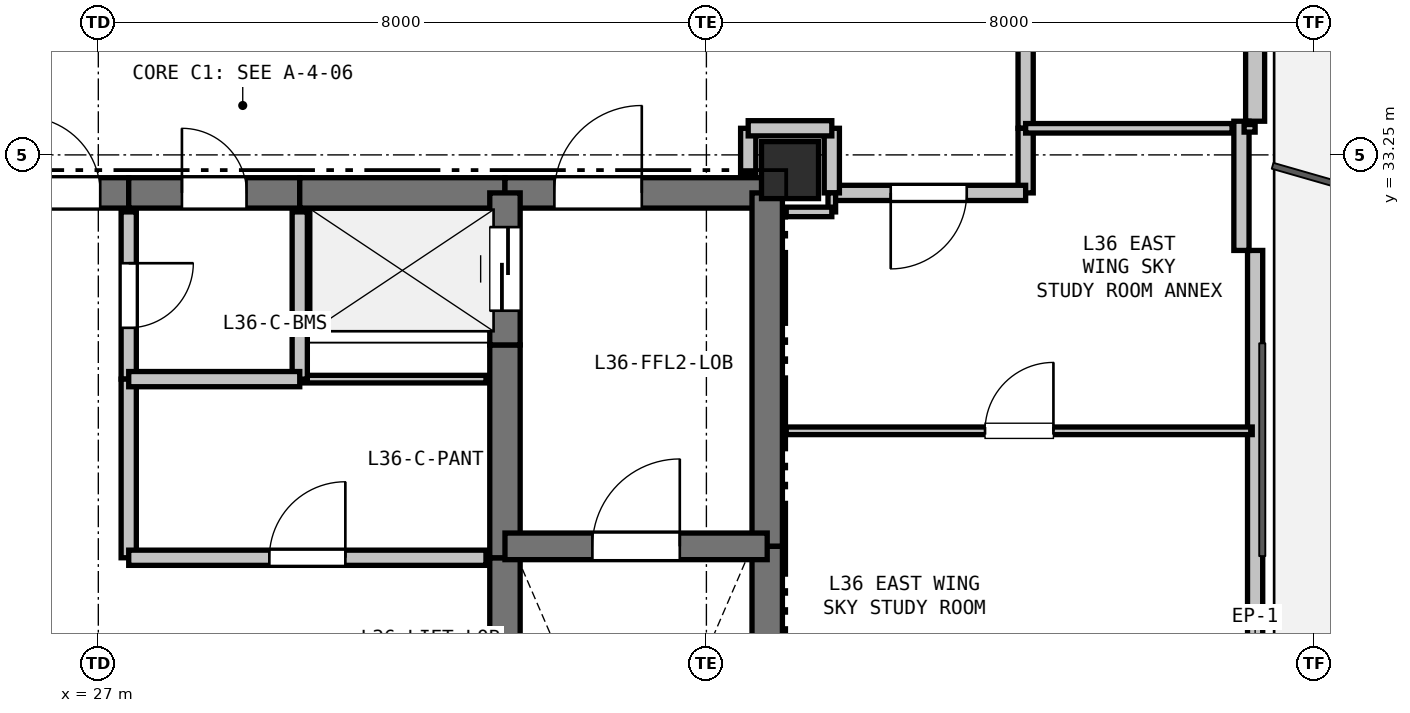
"""IFC4 building model, lengths in metres.
Left out: names, types, materials, properties, quantities, classifications, styles, units other than length and angle.
Written with IfcOpenShell. Run it as: python <this file> out.ifc"""

import sys

from ifc_helpers import new_model, si_unit, direction, frame, frame_2d, origin, origin_2d, place, context, subcontext, project, spatial, rectangle, extrude, element, fill, save


model = new_model("IFC4")
c1 = context("Model", 3, precision=1e-05, world=origin(), true_north=direction((0.0, 1.0)))
c2 = subcontext(c1, "Body", "Model", "MODEL_VIEW")
j1 = project(units=[si_unit("LENGTHUNIT", "METRE"), si_unit("PLANEANGLEUNIT", "RADIAN")], contexts=[c1])
p1 = place(None, origin())
s1 = spatial("IfcSite", under=j1, at=p1, CompositionType="ELEMENT")
p2 = place(p1, origin())
s2 = spatial("IfcBuilding", under=s1, at=p2, CompositionType="ELEMENT")
p3 = place(p2, frame((0.0, 0.0, 131.1)))
s3 = spatial("IfcBuildingStorey", under=s2, at=p3, CompositionType="ELEMENT", Elevation=131.1)
p4 = place(p3, frame((36.1, 33.05, 0.0), z_axis=(0.0, 0.0, 1.0), x_axis=(1.0, 0.0, 0.0)))
e1 = element("IfcColumn", 1, at=p4, inside=s3, PredefinedType="COLUMN", context=c2, shape_type="SweptSolid", body=[
    extrude(rectangle(XDim=0.75, YDim=0.75, at=origin_2d()), origin(), (0.0, 0.0, 1.0), 3.3),
])
p5 = place(p3, frame((42.219, 44.879, 0.0), z_axis=(0.0, 0.0, 1.0), x_axis=(0.0, -1.0, 0.0)))
e2 = element("IfcWall", 2, at=p5, inside=s3, PredefinedType="SOLIDWALL", context=c2, shape_type="SweptSolid", body=[
    extrude(rectangle(XDim=11.186, YDim=0.25, at=frame_2d((5.593, 0.0))), origin(), (0.0, 0.0, 1.0), 2.68),
])
p6 = place(p5, frame((8.109, 0.0, 0.0)))
e3 = element("IfcOpeningElement", 3, at=p6, cuts=e2, PredefinedType="OPENING", context=c2, shape_type="SweptSolid", body=[
    extrude(rectangle(XDim=1.1, YDim=2.1, at=frame_2d((0.55, 1.05))), frame((0.0, 0.135, 0.0), z_axis=(0.0, -1.0, 0.0), x_axis=(1.0, 0.0, 0.0)), (0.0, 0.0, 1.0), 0.27),
])
p7 = place(p5, frame((3.886, 0.0, 0.9)))
e4 = element("IfcOpeningElement", 4, at=p7, cuts=e2, PredefinedType="OPENING", context=c2, shape_type="SweptSolid", body=[
    extrude(rectangle(XDim=1.2, YDim=1.4, at=frame_2d((0.6, 0.7))), frame((0.0, 0.135, 0.0), z_axis=(0.0, -1.0, 0.0), x_axis=(1.0, 0.0, 0.0)), (0.0, 0.0, 1.0), 0.27),
])
p8 = place(p3, frame((42.219, 31.993, 0.0), z_axis=(0.0, 0.0, 1.0), x_axis=(0.0, -1.0, 0.0)))
e5 = element("IfcWall", 5, at=p8, inside=s3, PredefinedType="PARAPET", context=c2, shape_type="SweptSolid", body=[
    extrude(rectangle(XDim=10.486, YDim=0.2, at=frame_2d((5.243, 0.0))), origin(), (0.0, 0.0, 1.0), 0.2),
])
p9 = place(p3, frame((42.039, 33.693, 0.0), z_axis=(0.0, 0.0, 1.0), x_axis=(0.0, -1.0, 0.0)))
e6 = element("IfcWall", 6, at=p9, inside=s3, PredefinedType="PARAPET", context=c2, shape_type="SweptSolid", body=[
    extrude(rectangle(XDim=1.7, YDim=0.2, at=frame_2d((0.85, 0.0))), origin(), (0.0, 0.0, 1.0), 2.68),
])
p10 = place(p3, frame((25.65, 32.75, 0.0), z_axis=(0.0, 0.0, 1.0), x_axis=(1.0, 0.0, 0.0)))
e7 = element("IfcWall", 7, at=p10, inside=s3, PredefinedType="SHEAR", context=c2, shape_type="SweptSolid", body=[
    extrude(rectangle(XDim=1.75, YDim=0.4, at=frame_2d((0.875, 0.0))), origin(), (0.0, 0.0, 1.0), 3.06),
])
p11 = place(p10, frame((0.375, 0.0, 0.0)))
e8 = element("IfcOpeningElement", 8, at=p11, cuts=e7, PredefinedType="OPENING", context=c2, shape_type="SweptSolid", body=[
    extrude(rectangle(XDim=1.0, YDim=2.15, at=frame_2d((0.5, 1.075))), frame((0.0, 0.21, 0.0), z_axis=(0.0, -1.0, 0.0), x_axis=(1.0, 0.0, 0.0)), (0.0, 0.0, 1.0), 0.42),
])
p12 = place(p3, frame((27.4, 32.75, 0.0), z_axis=(0.0, 0.0, 1.0), x_axis=(1.0, 0.0, 0.0)))
e9 = element("IfcWall", 9, at=p12, inside=s3, PredefinedType="SHEAR", context=c2, shape_type="SweptSolid", body=[
    extrude(rectangle(XDim=2.25, YDim=0.4, at=frame_2d((1.125, 0.0))), origin(), (0.0, 0.0, 1.0), 3.06),
])
p13 = place(p12, frame((0.7, 0.0, 0.0)))
e10 = element("IfcOpeningElement", 10, at=p13, cuts=e9, PredefinedType="OPENING", context=c2, shape_type="SweptSolid", body=[
    extrude(rectangle(XDim=0.85, YDim=2.1, at=frame_2d((0.425, 1.05))), frame((0.0, 0.21, 0.0), z_axis=(0.0, -1.0, 0.0), x_axis=(1.0, 0.0, 0.0)), (0.0, 0.0, 1.0), 0.42),
])
p14 = place(p3, frame((29.65, 32.75, 0.0), z_axis=(0.0, 0.0, 1.0), x_axis=(1.0, 0.0, 0.0)))
e11 = element("IfcWall", 11, at=p14, inside=s3, PredefinedType="SHEAR", context=c2, shape_type="SweptSolid", body=[
    extrude(rectangle(XDim=2.7, YDim=0.4, at=frame_2d((1.35, 0.0))), origin(), (0.0, 0.0, 1.0), 3.06),
])
p15 = place(p3, frame((32.35, 32.75, 0.0), z_axis=(0.0, 0.0, 1.0), x_axis=(1.0, 0.0, 0.0)))
e12 = element("IfcWall", 12, at=p15, inside=s3, PredefinedType="SHEAR", context=c2, shape_type="SweptSolid", body=[
    extrude(rectangle(XDim=3.45, YDim=0.4, at=frame_2d((1.725, 0.0))), origin(), (0.0, 0.0, 1.0), 3.06),
])
p16 = place(p15, frame((0.65, 0.0, 0.0)))
e13 = element("IfcOpeningElement", 13, at=p16, cuts=e12, PredefinedType="OPENING", context=c2, shape_type="SweptSolid", body=[
    extrude(rectangle(XDim=1.15, YDim=2.15, at=frame_2d((0.575, 1.075))), frame((0.0, 0.21, 0.0), z_axis=(0.0, -1.0, 0.0), x_axis=(1.0, 0.0, 0.0)), (0.0, 0.0, 1.0), 0.42),
])
p17 = place(p3, frame((35.8, 32.75, 0.0), z_axis=(0.0, 0.0, 1.0), x_axis=(0.0, -1.0, 0.0)))
e14 = element("IfcWall", 14, at=p17, inside=s3, PredefinedType="SHEAR", context=c2, shape_type="SweptSolid", body=[
    extrude(rectangle(XDim=4.65, YDim=0.4, at=frame_2d((2.325, 0.0))), origin(), (0.0, 0.0, 1.0), 3.06),
])
p18 = place(p3, frame((35.8, 28.1, 0.0), z_axis=(0.0, 0.0, 1.0), x_axis=(0.0, -1.0, 0.0)))
e15 = element("IfcWall", 15, at=p18, inside=s3, PredefinedType="SHEAR", context=c2, shape_type="SweptSolid", body=[
    extrude(rectangle(XDim=7.35, YDim=0.4, at=frame_2d((3.675, 0.0))), origin(), (0.0, 0.0, 1.0), 3.06),
])
p19 = place(p3, frame((32.35, 25.55, 0.0), z_axis=(0.0, 0.0, 1.0), x_axis=(0.0, 1.0, 0.0)))
e16 = element("IfcWall", 16, at=p19, inside=s3, PredefinedType="SHEAR", context=c2, shape_type="SweptSolid", body=[
    extrude(rectangle(XDim=2.4, YDim=0.4, at=frame_2d((1.2, 0.0))), origin(), (0.0, 0.0, 1.0), 3.06),
])
p20 = place(p3, frame((32.35, 27.95, 0.0), z_axis=(0.0, 0.0, 1.0), x_axis=(0.0, 1.0, 0.0)))
e17 = element("IfcWall", 17, at=p20, inside=s3, PredefinedType="SHEAR", context=c2, shape_type="SweptSolid", body=[
    extrude(rectangle(XDim=2.8, YDim=0.4, at=frame_2d((1.4, 0.0))), origin(), (0.0, 0.0, 1.0), 3.06),
])
p21 = place(p3, frame((32.35, 30.75, 0.0), z_axis=(0.0, 0.0, 1.0), x_axis=(0.0, 1.0, 0.0)))
e18 = element("IfcWall", 18, at=p21, inside=s3, PredefinedType="SHEAR", context=c2, shape_type="SweptSolid", body=[
    extrude(rectangle(XDim=2.0, YDim=0.4, at=frame_2d((1.0, 0.0))), origin(), (0.0, 0.0, 1.0), 3.06),
])
p22 = place(p21, frame((0.45, 0.0, 0.0)))
e19 = element("IfcOpeningElement", 19, at=p22, cuts=e18, PredefinedType="OPENING", context=c2, shape_type="SweptSolid", body=[
    extrude(rectangle(XDim=1.1, YDim=2.15, at=frame_2d((0.55, 1.075))), frame((0.0, 0.21, 0.0), z_axis=(0.0, -1.0, 0.0), x_axis=(1.0, 0.0, 0.0)), (0.0, 0.0, 1.0), 0.42),
])
p23 = place(p3, frame((32.35, 28.1, 0.0), z_axis=(0.0, 0.0, 1.0), x_axis=(1.0, 0.0, 0.0)))
e20 = element("IfcWall", 20, at=p23, inside=s3, PredefinedType="SHEAR", context=c2, shape_type="SweptSolid", body=[
    extrude(rectangle(XDim=3.45, YDim=0.35, at=frame_2d((1.725, 0.0))), origin(), (0.0, 0.0, 1.0), 3.06),
])
p24 = place(p23, frame((1.15, 0.0, 0.0)))
e21 = element("IfcOpeningElement", 21, at=p24, cuts=e20, PredefinedType="OPENING", context=c2, shape_type="SweptSolid", body=[
    extrude(rectangle(XDim=1.15, YDim=2.15, at=frame_2d((0.575, 1.075))), frame((0.0, 0.185, 0.0), z_axis=(0.0, -1.0, 0.0), x_axis=(1.0, 0.0, 0.0)), (0.0, 0.0, 1.0), 0.37),
])
p25 = place(p3, frame((32.1, 30.3, 0.0), z_axis=(0.0, 0.0, 1.0), x_axis=(-1.0, 0.0, 0.0)))
e22 = element("IfcWall", 22, at=p25, inside=s3, PredefinedType="PARTITIONING", context=c2, shape_type="SweptSolid", body=[
    extrude(rectangle(XDim=2.45, YDim=0.1, at=frame_2d((1.225, 0.0))), origin(), (0.0, 0.0, 1.0), 3.06),
])
p26 = place(p3, frame((29.65, 30.3, 0.0), z_axis=(0.0, 0.0, 1.0), x_axis=(0.0, 1.0, 0.0)))
e23 = element("IfcWall", 23, at=p26, inside=s3, PredefinedType="PARTITIONING", context=c2, shape_type="SweptSolid", body=[
    extrude(rectangle(XDim=2.2, YDim=0.2, at=frame_2d((1.1, 0.0))), origin(), (0.0, 0.0, 1.0), 3.06),
])
p27 = place(p3, frame((27.4, 32.5, 0.0), z_axis=(0.0, 0.0, 1.0), x_axis=(0.0, -1.0, 0.0)))
e24 = element("IfcWall", 24, at=p27, inside=s3, PredefinedType="PARTITIONING", context=c2, shape_type="SweptSolid", body=[
    extrude(rectangle(XDim=2.2, YDim=0.2, at=frame_2d((1.1, 0.0))), origin(), (0.0, 0.0, 1.0), 3.06),
])
p28 = place(p27, frame((0.675, 0.0, 0.0)))
e25 = element("IfcOpeningElement", 25, at=p28, cuts=e24, PredefinedType="OPENING", context=c2, shape_type="SweptSolid", body=[
    extrude(rectangle(XDim=0.85, YDim=2.1, at=frame_2d((0.425, 1.05))), frame((0.0, 0.11, 0.0), z_axis=(0.0, -1.0, 0.0), x_axis=(1.0, 0.0, 0.0)), (0.0, 0.0, 1.0), 0.22),
])
p29 = place(p3, frame((27.4, 30.3, 0.0), z_axis=(0.0, 0.0, 1.0), x_axis=(0.0, -1.0, 0.0)))
e26 = element("IfcWall", 26, at=p29, inside=s3, PredefinedType="PARTITIONING", context=c2, shape_type="SweptSolid", body=[
    extrude(rectangle(XDim=2.35, YDim=0.2, at=frame_2d((1.175, 0.0))), origin(), (0.0, 0.0, 1.0), 3.06),
])
p30 = place(p3, frame((27.4, 27.95, 0.0), z_axis=(0.0, 0.0, 1.0), x_axis=(1.0, 0.0, 0.0)))
e27 = element("IfcWall", 27, at=p30, inside=s3, PredefinedType="PARTITIONING", context=c2, shape_type="SweptSolid", body=[
    extrude(rectangle(XDim=4.7, YDim=0.2, at=frame_2d((2.35, 0.0))), origin(), (0.0, 0.0, 1.0), 3.06),
])
p31 = place(p30, frame((1.85, 0.0, 0.0)))
e28 = element("IfcOpeningElement", 28, at=p31, cuts=e27, PredefinedType="OPENING", context=c2, shape_type="SweptSolid", body=[
    extrude(rectangle(XDim=1.0, YDim=2.15, at=frame_2d((0.5, 1.075))), frame((0.0, 0.11, 0.0), z_axis=(0.0, -1.0, 0.0), x_axis=(1.0, 0.0, 0.0)), (0.0, 0.0, 1.0), 0.22),
])
p32 = place(p3, frame((35.55, 33.6, 0.0), z_axis=(0.0, 0.0, 1.0), x_axis=(0.0, -1.0, 0.0)))
e29 = element("IfcWall", 29, at=p32, inside=s3, PredefinedType="PARTITIONING", context=c2, shape_type="SweptSolid", body=[
    extrude(rectangle(XDim=0.6, YDim=0.2, at=frame_2d((0.3, 0.0))), origin(), (0.0, 0.0, 1.0), 2.508),
])
p33 = place(p3, frame((39.2, 35.35, 0.0), z_axis=(0.0, 0.0, 1.0), x_axis=(0.0, -1.0, 0.0)))
e30 = element("IfcWall", 30, at=p33, inside=s3, PredefinedType="PARTITIONING", context=c2, shape_type="SweptSolid", body=[
    extrude(rectangle(XDim=1.75, YDim=0.2, at=frame_2d((0.875, 0.0))), origin(), (0.0, 0.0, 1.0), 3.06),
])
p34 = place(p3, frame((39.2, 33.6, 0.0), z_axis=(0.0, 0.0, 1.0), x_axis=(0.0, -1.0, 0.0)))
e31 = element("IfcWall", 31, at=p34, inside=s3, PredefinedType="PARTITIONING", context=c2, shape_type="SweptSolid", body=[
    extrude(rectangle(XDim=0.85, YDim=0.2, at=frame_2d((0.425, 0.0))), origin(), (0.0, 0.0, 1.0), 3.06),
])
p35 = place(p3, frame((39.2, 32.75, 0.0), z_axis=(0.0, 0.0, 1.0), x_axis=(-1.0, 0.0, 0.0)))
e32 = element("IfcWall", 32, at=p35, inside=s3, PredefinedType="PARTITIONING", context=c2, shape_type="SweptSolid", body=[
    extrude(rectangle(XDim=2.55, YDim=0.2, at=frame_2d((1.275, 0.0))), origin(), (0.0, 0.0, 1.0), 3.06),
])
p36 = place(p35, frame((0.775, 0.0, 0.0)))
e33 = element("IfcOpeningElement", 33, at=p36, cuts=e32, PredefinedType="OPENING", context=c2, shape_type="SweptSolid", body=[
    extrude(rectangle(XDim=1.0, YDim=2.15, at=frame_2d((0.5, 1.075))), frame((0.0, 0.11, 0.0), z_axis=(0.0, -1.0, 0.0), x_axis=(1.0, 0.0, 0.0)), (0.0, 0.0, 1.0), 0.22),
])
p37 = place(p3, frame((36.65, 32.75, 0.0), z_axis=(0.0, 0.0, 1.0), x_axis=(0.0, 1.0, 0.0)))
e34 = element("IfcWall", 34, at=p37, inside=s3, PredefinedType="PARTITIONING", context=c2, shape_type="SweptSolid", body=[
    extrude(rectangle(XDim=0.85, YDim=0.2, at=frame_2d((0.425, 0.0))), origin(), (0.0, 0.0, 1.0), 2.433),
])
p38 = place(p3, frame((36.65, 33.6, 0.0), z_axis=(0.0, 0.0, 1.0), x_axis=(-1.0, 0.0, 0.0)))
e35 = element("IfcWall", 35, at=p38, inside=s3, PredefinedType="PARTITIONING", context=c2, shape_type="SweptSolid", body=[
    extrude(rectangle(XDim=1.1, YDim=0.2, at=frame_2d((0.55, 0.0))), origin(), (0.0, 0.0, 1.0), 2.433),
])
p39 = place(p3, frame((27.4, 30.3, 0.0), z_axis=(0.0, 0.0, 1.0), x_axis=(1.0, 0.0, 0.0)))
e36 = element("IfcWall", 36, at=p39, inside=s3, PredefinedType="PARTITIONING", context=c2, shape_type="SweptSolid", body=[
    extrude(rectangle(XDim=2.25, YDim=0.2, at=frame_2d((1.125, 0.0))), origin(), (0.0, 0.0, 1.0), 3.06),
])
p40 = place(p3, frame((36.05, 29.62, 0.0), z_axis=(0.0, 0.0, 1.0), x_axis=(1.0, 0.0, 0.0)))
e37 = element("IfcWall", 37, at=p40, inside=s3, PredefinedType="PARTITIONING", context=c2, shape_type="SweptSolid", body=[
    extrude(rectangle(XDim=6.131, YDim=0.1, at=frame_2d((3.065, 0.0))), origin(), (0.0, 0.0, 1.0), 2.365),
])
p41 = place(p40, frame((2.615, 0.0, 0.0)))
e38 = element("IfcOpeningElement", 38, at=p41, cuts=e37, PredefinedType="OPENING", context=c2, shape_type="SweptSolid", body=[
    extrude(rectangle(XDim=0.9, YDim=2.1, at=frame_2d((0.45, 1.05))), frame((0.0, 0.06, 0.0), z_axis=(0.0, -1.0, 0.0), x_axis=(1.0, 0.0, 0.0)), (0.0, 0.0, 1.0), 0.12),
])
p42 = place(p3, frame((36.65, 32.5, 0.0), z_axis=(0.0, 0.0, 1.0), x_axis=(0.0, 1.0, 0.0)))
e39 = element("IfcWall", 39, at=p42, inside=s3, PredefinedType="PARTITIONING", context=c2, shape_type="SweptSolid", body=[
    extrude(rectangle(XDim=0.25, YDim=0.1, at=frame_2d((0.125, 0.0))), origin(), (0.0, 0.0, 1.0), 3.06),
])
p43 = place(p3, frame((39.2, 33.6, 0.0), z_axis=(0.0, 0.0, 1.0), x_axis=(1.0, 0.0, 0.0)))
e40 = element("IfcWall", 40, at=p43, inside=s3, PredefinedType="PARTITIONING", context=c2, shape_type="SweptSolid", body=[
    extrude(rectangle(XDim=2.715, YDim=0.125, at=frame_2d((1.358, 0.0))), origin(), (0.0, 0.0, 1.0), 2.365),
])
p44 = place(p3, frame((42.074, 33.6, 0.0), z_axis=(0.0, 0.0, 1.0), x_axis=(1.0, 0.0, 0.0)))
e41 = element("IfcWall", 41, at=p44, inside=s3, PredefinedType="PARTITIONING", context=c2, shape_type="SweptSolid", body=[
    extrude(rectangle(XDim=0.145, YDim=0.1, at=frame_2d((0.072, 0.0))), origin(), (0.0, 0.0, 1.0), 3.06),
])
p45 = place(p3, frame((36.05, 32.5, 0.0), z_axis=(0.0, 0.0, 1.0), x_axis=(1.0, 0.0, 0.0)))
e42 = element("IfcWall", 42, at=p45, inside=s3, PredefinedType="PARTITIONING", context=c2, shape_type="SweptSolid", body=[
    extrude(rectangle(XDim=0.6, YDim=0.125, at=frame_2d((0.3, 0.0))), origin(), (0.0, 0.0, 1.0), 2.508),
])
p46 = place(p11, origin())
e43 = element("IfcDoor", 43, at=p46, inside=s3, OperationType="SINGLE_SWING_LEFT", PredefinedType="DOOR", context=c2, shape_type="SweptSolid", body=[
    extrude(rectangle(XDim=1.0, YDim=2.15, at=frame_2d((0.5, 1.075))), frame((0.0, 0.025, 0.0), z_axis=(0.0, -1.0, 0.0), x_axis=(1.0, 0.0, 0.0)), (0.0, 0.0, 1.0), 0.05),
])
fill(e8, e43)
p47 = place(p22, origin())
e44 = element("IfcDoor", 44, at=p47, inside=s3, OperationType="SLIDING_TO_LEFT", PredefinedType="DOOR", context=c2, shape_type="SweptSolid", body=[
    extrude(rectangle(XDim=1.1, YDim=2.15, at=frame_2d((0.55, 1.075))), frame((0.0, 0.025, 0.0), z_axis=(0.0, -1.0, 0.0), x_axis=(1.0, 0.0, 0.0)), (0.0, 0.0, 1.0), 0.05),
])
fill(e19, e44)
p48 = place(p24, origin())
e45 = element("IfcDoor", 45, at=p48, inside=s3, OperationType="SINGLE_SWING_RIGHT", PredefinedType="DOOR", context=c2, shape_type="SweptSolid", body=[
    extrude(rectangle(XDim=1.15, YDim=2.15, at=frame_2d((0.575, 1.075))), frame((0.0, 0.025, 0.0), z_axis=(0.0, -1.0, 0.0), x_axis=(1.0, 0.0, 0.0)), (0.0, 0.0, 1.0), 0.05),
])
fill(e21, e45)
p49 = place(p16, origin())
e46 = element("IfcDoor", 46, at=p49, inside=s3, OperationType="SINGLE_SWING_RIGHT", PredefinedType="DOOR", context=c2, shape_type="SweptSolid", body=[
    extrude(rectangle(XDim=1.15, YDim=2.15, at=frame_2d((0.575, 1.075))), frame((0.0, 0.025, 0.0), z_axis=(0.0, -1.0, 0.0), x_axis=(1.0, 0.0, 0.0)), (0.0, 0.0, 1.0), 0.05),
])
fill(e13, e46)
p50 = place(p31, origin())
e47 = element("IfcDoor", 47, at=p50, inside=s3, OperationType="SINGLE_SWING_RIGHT", PredefinedType="DOOR", context=c2, shape_type="SweptSolid", body=[
    extrude(rectangle(XDim=1.0, YDim=2.15, at=frame_2d((0.5, 1.075))), frame((0.0, 0.025, 0.0), z_axis=(0.0, -1.0, 0.0), x_axis=(1.0, 0.0, 0.0)), (0.0, 0.0, 1.0), 0.05),
])
fill(e28, e47)
p51 = place(p28, origin())
e48 = element("IfcDoor", 48, at=p51, inside=s3, OperationType="SINGLE_SWING_LEFT", PredefinedType="DOOR", context=c2, shape_type="SweptSolid", body=[
    extrude(rectangle(XDim=0.85, YDim=2.1, at=frame_2d((0.425, 1.05))), frame((0.0, 0.025, 0.0), z_axis=(0.0, -1.0, 0.0), x_axis=(1.0, 0.0, 0.0)), (0.0, 0.0, 1.0), 0.05),
])
fill(e25, e48)
p52 = place(p13, origin())
e49 = element("IfcDoor", 49, at=p52, inside=s3, OperationType="SINGLE_SWING_LEFT", PredefinedType="DOOR", context=c2, shape_type="SweptSolid", body=[
    extrude(rectangle(XDim=0.85, YDim=2.1, at=frame_2d((0.425, 1.05))), frame((0.0, 0.025, 0.0), z_axis=(0.0, -1.0, 0.0), x_axis=(1.0, 0.0, 0.0)), (0.0, 0.0, 1.0), 0.05),
])
fill(e10, e49)
p53 = place(p36, origin())
e50 = element("IfcDoor", 50, at=p53, inside=s3, OperationType="SINGLE_SWING_RIGHT", PredefinedType="DOOR", context=c2, shape_type="SweptSolid", body=[
    extrude(rectangle(XDim=1.0, YDim=2.15, at=frame_2d((0.5, 1.075))), frame((0.0, 0.025, 0.0), z_axis=(0.0, -1.0, 0.0), x_axis=(1.0, 0.0, 0.0)), (0.0, 0.0, 1.0), 0.05),
])
fill(e33, e50)
p54 = place(p41, origin())
e51 = element("IfcDoor", 51, at=p54, inside=s3, OperationType="SINGLE_SWING_RIGHT", PredefinedType="DOOR", context=c2, shape_type="SweptSolid", body=[
    extrude(rectangle(XDim=0.9, YDim=2.1, at=frame_2d((0.45, 1.05))), frame((0.0, 0.025, 0.0), z_axis=(0.0, -1.0, 0.0), x_axis=(1.0, 0.0, 0.0)), (0.0, 0.0, 1.0), 0.05),
])
fill(e38, e51)
save(model, sys.argv[1])
